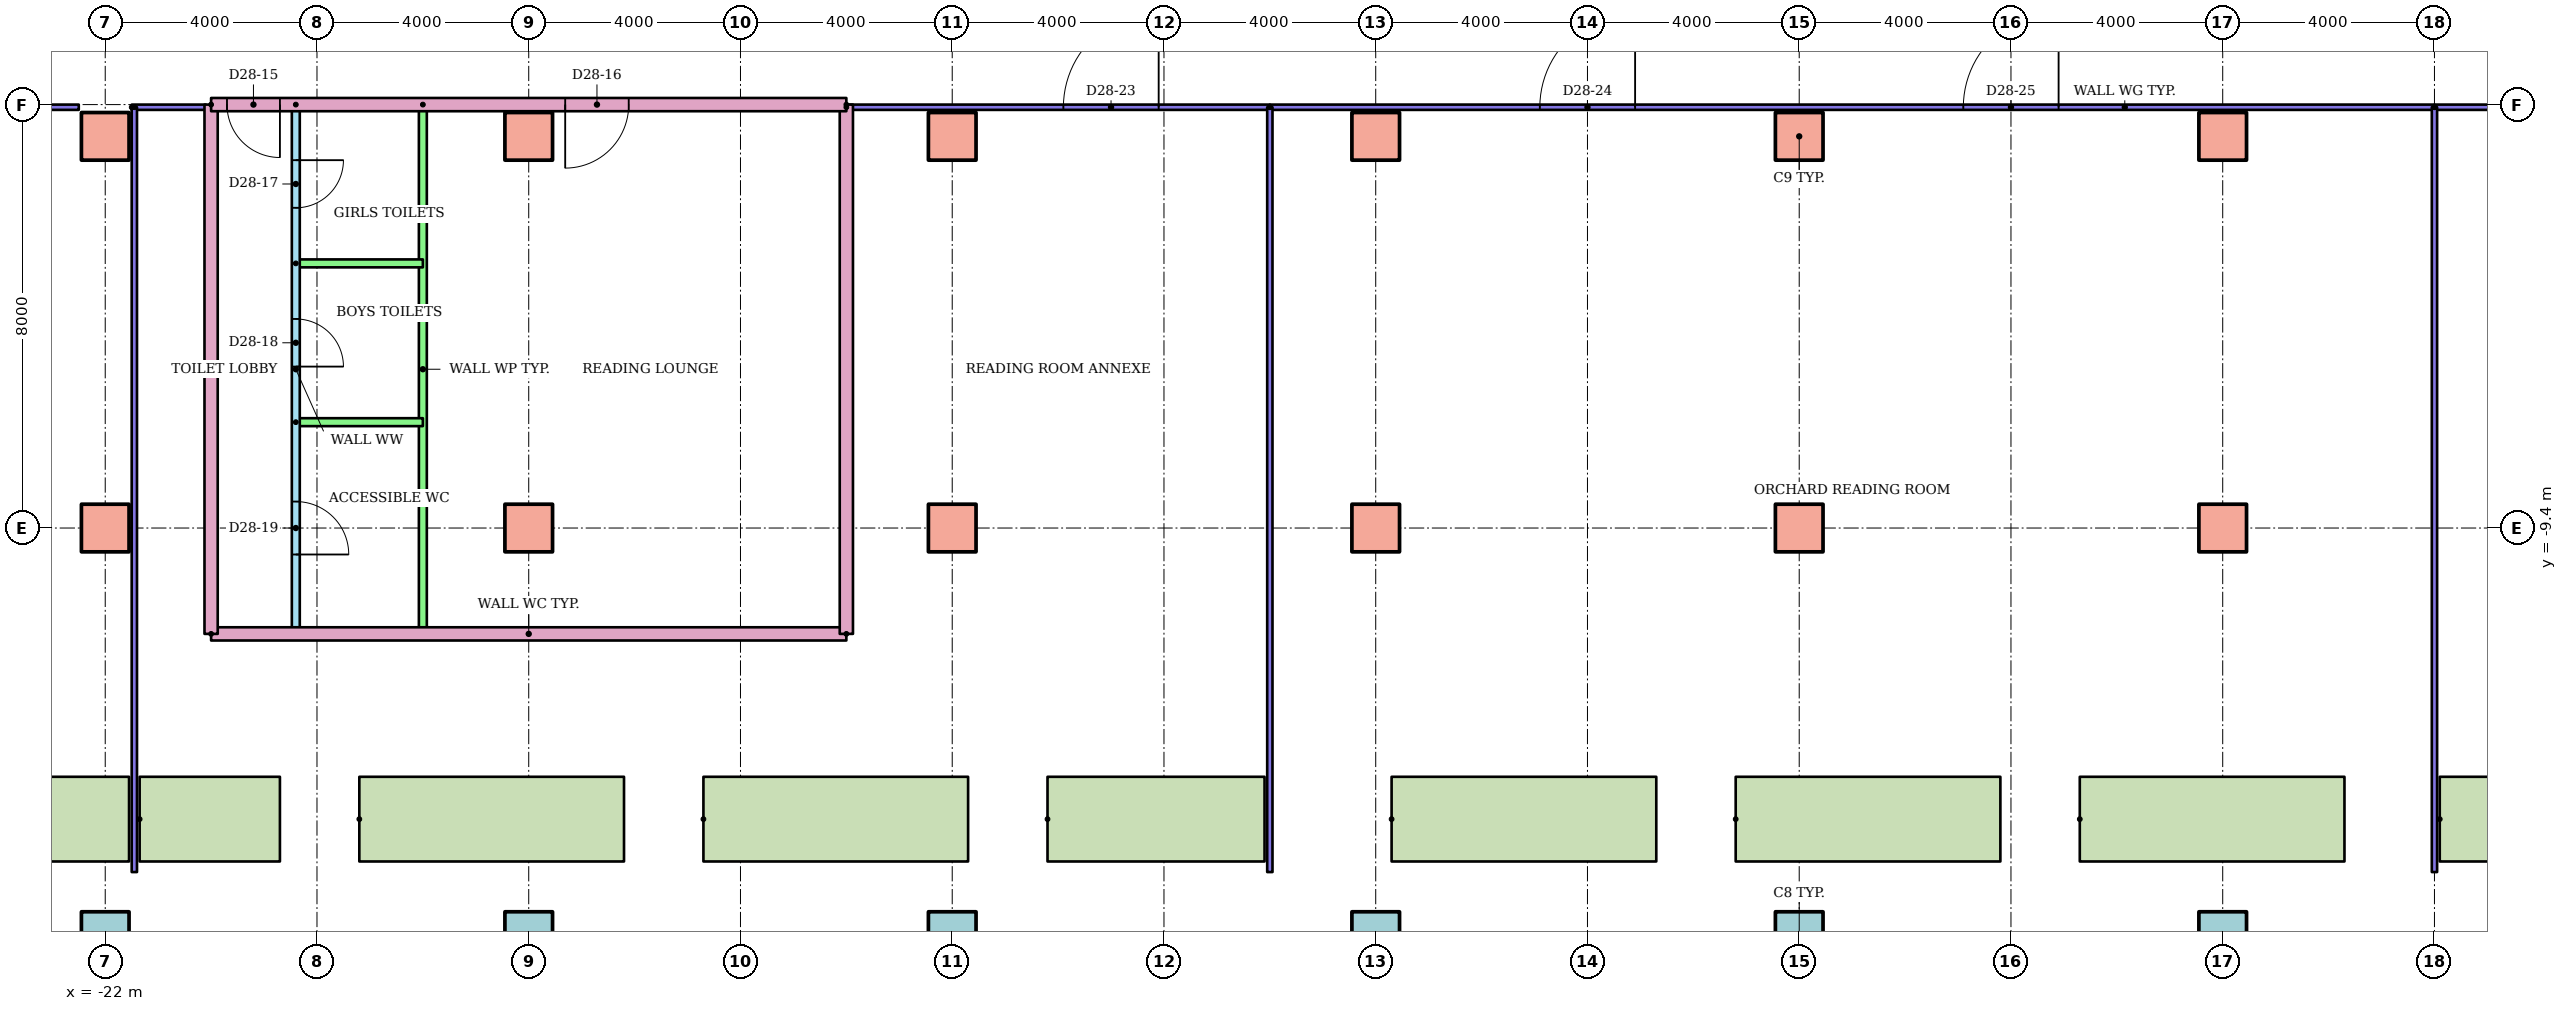
"""IFC4 building model, lengths in metres.
Left out: names, types, materials, properties, quantities, classifications, styles, units other than length and angle.
Written with IfcOpenShell. Run it as: python <this file> out.ifc"""

import sys

from ifc_helpers import new_model, si_unit, direction, frame, frame_2d, origin, origin_2d, place, context, subcontext, project, spatial, rectangle, hollow_rectangle, extrude, element, fill, save


model = new_model("IFC4")
c1 = context("Model", 3, precision=1e-05, world=origin(), true_north=direction((0.0, 1.0)))
c2 = subcontext(c1, "Body", "Model", "MODEL_VIEW")
j1 = project(units=[si_unit("LENGTHUNIT", "METRE"), si_unit("PLANEANGLEUNIT", "RADIAN")], contexts=[c1])
p1 = place(None, origin())
s1 = spatial("IfcSite", under=j1, at=p1, CompositionType="ELEMENT")
p2 = place(p1, origin())
s2 = spatial("IfcBuilding", under=s1, at=p2, CompositionType="ELEMENT")
p3 = place(p2, frame((0.0, 0.0, 106.3)))
s3 = spatial("IfcBuildingStorey", under=s2, at=p3, CompositionType="ELEMENT", Elevation=106.3)
for number, where in (
    (1, (-22.0, -17.1, 0.0)),
    (2, (-14.0, -17.1, 0.0)),
    (3, (-6.0, -17.1, 0.0)),
    (4, (2.0, -17.1, 0.0)),
    (5, (10.0, -17.1, 0.0)),
    (6, (18.0, -17.1, 0.0)),
):
    element("IfcColumn", number, at=place(p3, frame(where)), inside=s3, PredefinedType="COLUMN", context=c2, shape_type="SweptSolid", body=[
        extrude(hollow_rectangle(XDim=0.9, YDim=0.9, WallThickness=0.045, at=origin_2d()), origin(), (0.0, 0.0, 1.0), 9.6),
    ])
for number, where in (
    (7, (-22.0, -9.4, 0.0)),
    (8, (-14.0, -9.4, 0.0)),
    (9, (-6.0, -9.4, 0.0)),
    (10, (2.0, -9.4, 0.0)),
    (11, (10.0, -9.4, 0.0)),
    (12, (18.0, -9.4, 0.0)),
    (13, (-22.0, -2.0, 0.0)),
    (14, (-14.0, -2.0, 0.0)),
    (15, (-6.0, -2.0, 0.0)),
    (16, (2.0, -2.0, 0.0)),
    (17, (10.0, -2.0, 0.0)),
    (18, (18.0, -2.0, 0.0)),
):
    element("IfcColumn", number, at=place(p3, frame(where)), inside=s3, PredefinedType="COLUMN", context=c2, shape_type="SweptSolid", body=[
        extrude(rectangle(XDim=0.9, YDim=0.9, at=origin_2d()), origin(), (0.0, 0.0, 1.0), 9.6),
    ])
for number, where in (
    (19, (-17.2, -14.9, 0.0)),
    (20, (-10.7, -14.9, 0.0)),
    (21, (2.3, -14.9, 0.0)),
    (22, (8.8, -14.9, 0.0)),
    (23, (15.3, -14.9, 0.0)),
):
    element("IfcWall", number, at=place(p3, frame(where)), inside=s3, PredefinedType="STANDARD", context=c2, shape_type="SweptSolid", body=[
        extrude(rectangle(XDim=5.0, YDim=1.6, at=frame_2d((2.5, 0.0))), origin(), (0.0, 0.0, 1.0), 0.8),
    ])
p4 = place(p3, frame((-20.0, -11.4, 0.0)))
e24 = element("IfcWall", 24, at=p4, inside=s3, PredefinedType="PARTITIONING", context=c2, shape_type="SweptSolid", body=[
    extrude(rectangle(XDim=12.0, YDim=0.25, at=frame_2d((6.0, 0.0))), origin(), (0.0, 0.0, 1.0), 8.8),
])
for number, where, z_axis, x_axis in (
    (25, (-20.0, -1.4, 0.0), (0.0, 0.0, 1.0), (0.0, -1.0, 0.0)),
    (26, (-8.0, -11.4, 0.0), (0.0, 0.0, 1.0), (0.0, 1.0, 0.0)),
):
    element("IfcWall", number, at=place(p3, frame(where, z_axis=z_axis, x_axis=x_axis)), inside=s3, PredefinedType="PARTITIONING", context=c2, shape_type="SweptSolid", body=[
        extrude(rectangle(XDim=10.0, YDim=0.25, at=frame_2d((5.0, 0.0))), origin(), (0.0, 0.0, 1.0), 8.8),
    ])
p5 = place(p3, frame((-8.0, -1.4, 0.0), z_axis=(0.0, 0.0, 1.0), x_axis=(-1.0, 0.0, 0.0)))
e27 = element("IfcWall", 27, at=p5, inside=s3, PredefinedType="PARTITIONING", context=c2, shape_type="SweptSolid", body=[
    extrude(rectangle(XDim=12.0, YDim=0.25, at=frame_2d((6.0, 0.0))), origin(), (0.0, 0.0, 1.0), 8.8),
])
p6 = place(p5, frame((10.7, 0.0, 0.0)))
e28 = element("IfcOpeningElement", 28, at=p6, cuts=e27, PredefinedType="OPENING", context=c2, shape_type="SweptSolid", body=[
    extrude(rectangle(XDim=1.0, YDim=2.1, at=frame_2d((0.5, 1.05))), frame((0.0, 0.135, 0.0), z_axis=(0.0, -1.0, 0.0), x_axis=(1.0, 0.0, 0.0)), (0.0, 0.0, 1.0), 0.27),
])
p7 = place(p5, frame((4.111, 0.0, 0.0)))
e29 = element("IfcOpeningElement", 29, at=p7, cuts=e27, PredefinedType="OPENING", context=c2, shape_type="SweptSolid", body=[
    extrude(rectangle(XDim=1.2, YDim=2.1, at=frame_2d((0.6, 1.05))), frame((0.0, 0.135, 0.0), z_axis=(0.0, -1.0, 0.0), x_axis=(1.0, 0.0, 0.0)), (0.0, 0.0, 1.0), 0.27),
])
p8 = place(p3, frame((-18.4, -1.4, 0.0), z_axis=(0.0, 0.0, 1.0), x_axis=(0.0, -1.0, 0.0)))
e30 = element("IfcWall", 30, at=p8, inside=s3, PredefinedType="PARTITIONING", context=c2, shape_type="SweptSolid", body=[
    extrude(rectangle(XDim=10.0, YDim=0.15, at=frame_2d((5.0, 0.0))), origin(), (0.0, 0.0, 1.0), 8.8),
])
p9 = place(p8, frame((1.05, 0.0, 0.0)))
e31 = element("IfcOpeningElement", 31, at=p9, cuts=e30, PredefinedType="OPENING", context=c2, shape_type="SweptSolid", body=[
    extrude(rectangle(XDim=0.9, YDim=2.1, at=frame_2d((0.45, 1.05))), frame((0.0, 0.085, 0.0), z_axis=(0.0, -1.0, 0.0), x_axis=(1.0, 0.0, 0.0)), (0.0, 0.0, 1.0), 0.17),
])
p10 = place(p8, frame((4.05, 0.0, 0.0)))
e32 = element("IfcOpeningElement", 32, at=p10, cuts=e30, PredefinedType="OPENING", context=c2, shape_type="SweptSolid", body=[
    extrude(rectangle(XDim=0.9, YDim=2.1, at=frame_2d((0.45, 1.05))), frame((0.0, 0.085, 0.0), z_axis=(0.0, -1.0, 0.0), x_axis=(1.0, 0.0, 0.0)), (0.0, 0.0, 1.0), 0.17),
])
p11 = place(p8, frame((7.5, 0.0, 0.0)))
e33 = element("IfcOpeningElement", 33, at=p11, cuts=e30, PredefinedType="OPENING", context=c2, shape_type="SweptSolid", body=[
    extrude(rectangle(XDim=1.0, YDim=2.1, at=frame_2d((0.5, 1.05))), frame((0.0, 0.085, 0.0), z_axis=(0.0, -1.0, 0.0), x_axis=(1.0, 0.0, 0.0)), (0.0, 0.0, 1.0), 0.17),
])
p12 = place(p3, frame((-16.0, -1.4, 0.0), z_axis=(0.0, 0.0, 1.0), x_axis=(0.0, -1.0, 0.0)))
e34 = element("IfcWall", 34, at=p12, inside=s3, PredefinedType="PARTITIONING", context=c2, shape_type="SweptSolid", body=[
    extrude(rectangle(XDim=10.0, YDim=0.15, at=frame_2d((5.0, 0.0))), origin(), (0.0, 0.0, 1.0), 8.8),
])
for number, where in (
    (35, (-18.4, -4.4, 0.0)),
    (36, (-18.4, -7.4, 0.0)),
):
    element("IfcWall", number, at=place(p3, frame(where)), inside=s3, PredefinedType="PARTITIONING", context=c2, shape_type="SweptSolid", body=[
        extrude(rectangle(XDim=2.4, YDim=0.15, at=frame_2d((1.2, 0.0))), origin(), (0.0, 0.0, 1.0), 8.8),
    ])
p13 = place(p3, frame((-28.3, -1.45, 0.0)))
e37 = element("IfcWall", 37, at=p13, inside=s3, PredefinedType="PARTITIONING", context=c2, shape_type="SweptSolid", body=[
    extrude(rectangle(XDim=5.8, YDim=0.1, at=frame_2d((2.9, 0.0))), origin(), (0.0, 0.0, 1.0), 8.8),
])
p14 = place(p13, frame((2.2, 0.0, 0.0)))
e38 = element("IfcOpeningElement", 38, at=p14, cuts=e37, PredefinedType="OPENING", context=c2, shape_type="SweptSolid", body=[
    extrude(rectangle(XDim=1.2, YDim=2.1, at=frame_2d((0.6, 1.05))), frame((0.0, 0.06, 0.0), z_axis=(0.0, -1.0, 0.0), x_axis=(1.0, 0.0, 0.0)), (0.0, 0.0, 1.0), 0.12),
])
p15 = place(p3, frame((-21.5, -1.45, 0.0)))
e39 = element("IfcWall", 39, at=p15, inside=s3, PredefinedType="PARTITIONING", context=c2, shape_type="SweptSolid", body=[
    extrude(rectangle(XDim=1.4, YDim=0.1, at=frame_2d((0.7, 0.0))), origin(), (0.0, 0.0, 1.0), 8.8),
])
p16 = place(p3, frame((-8.0, -1.45, 0.0)))
e40 = element("IfcWall", 40, at=p16, inside=s3, PredefinedType="PARTITIONING", context=c2, shape_type="SweptSolid", body=[
    extrude(rectangle(XDim=8.0, YDim=0.1, at=frame_2d((4.0, 0.0))), origin(), (0.0, 0.0, 1.0), 8.8),
])
p17 = place(p16, frame((4.1, 0.0, 0.0)))
e41 = element("IfcOpeningElement", 41, at=p17, cuts=e40, PredefinedType="OPENING", context=c2, shape_type="SweptSolid", body=[
    extrude(rectangle(XDim=1.8, YDim=2.1, at=frame_2d((0.9, 1.05))), frame((0.0, 0.06, 0.0), z_axis=(0.0, -1.0, 0.0), x_axis=(1.0, 0.0, 0.0)), (0.0, 0.0, 1.0), 0.12),
])
p18 = place(p3, frame((0.0, -1.45, 0.0)))
e42 = element("IfcWall", 42, at=p18, inside=s3, PredefinedType="PARTITIONING", context=c2, shape_type="SweptSolid", body=[
    extrude(rectangle(XDim=22.0, YDim=0.1, at=frame_2d((11.0, 0.0))), origin(), (0.0, 0.0, 1.0), 8.8),
])
p19 = place(p18, frame((5.1, 0.0, 0.0)))
e43 = element("IfcOpeningElement", 43, at=p19, cuts=e42, PredefinedType="OPENING", context=c2, shape_type="SweptSolid", body=[
    extrude(rectangle(XDim=1.8, YDim=2.1, at=frame_2d((0.9, 1.05))), frame((0.0, 0.06, 0.0), z_axis=(0.0, -1.0, 0.0), x_axis=(1.0, 0.0, 0.0)), (0.0, 0.0, 1.0), 0.12),
])
p20 = place(p18, frame((13.1, 0.0, 0.0)))
e44 = element("IfcOpeningElement", 44, at=p20, cuts=e42, PredefinedType="OPENING", context=c2, shape_type="SweptSolid", body=[
    extrude(rectangle(XDim=1.8, YDim=2.1, at=frame_2d((0.9, 1.05))), frame((0.0, 0.06, 0.0), z_axis=(0.0, -1.0, 0.0), x_axis=(1.0, 0.0, 0.0)), (0.0, 0.0, 1.0), 0.12),
])
p21 = place(p3, frame((22.0, -1.45, 0.0)))
e45 = element("IfcWall", 45, at=p21, inside=s3, PredefinedType="PARTITIONING", context=c2, shape_type="SweptSolid", body=[
    extrude(rectangle(XDim=18.3, YDim=0.1, at=frame_2d((9.15, 0.0))), origin(), (0.0, 0.0, 1.0), 8.8),
])
p22 = place(p21, frame((7.1, 0.0, 0.0)))
e46 = element("IfcOpeningElement", 46, at=p22, cuts=e45, PredefinedType="OPENING", context=c2, shape_type="SweptSolid", body=[
    extrude(rectangle(XDim=1.8, YDim=2.1, at=frame_2d((0.9, 1.05))), frame((0.0, 0.06, 0.0), z_axis=(0.0, -1.0, 0.0), x_axis=(1.0, 0.0, 0.0)), (0.0, 0.0, 1.0), 0.12),
])
p23 = place(p21, frame((15.4, 0.0, 0.0)))
e47 = element("IfcOpeningElement", 47, at=p23, cuts=e45, PredefinedType="OPENING", context=c2, shape_type="SweptSolid", body=[
    extrude(rectangle(XDim=1.2, YDim=2.1, at=frame_2d((0.6, 1.05))), frame((0.0, 0.06, 0.0), z_axis=(0.0, -1.0, 0.0), x_axis=(1.0, 0.0, 0.0)), (0.0, 0.0, 1.0), 0.12),
])
for number, where, z_axis, x_axis in (
    (48, (22.0, -1.45, 0.0), (0.0, 0.0, 1.0), (0.0, -1.0, 0.0)),
    (49, (0.0, -1.45, 0.0), (0.0, 0.0, 1.0), (0.0, -1.0, 0.0)),
    (50, (-21.45, -1.45, 0.0), (0.0, 0.0, 1.0), (0.0, -1.0, 0.0)),
):
    element("IfcWall", number, at=place(p3, frame(where, z_axis=z_axis, x_axis=x_axis)), inside=s3, PredefinedType="PARTITIONING", context=c2, shape_type="SweptSolid", body=[
        extrude(rectangle(XDim=14.45, YDim=0.1, at=frame_2d((7.225, 0.0))), origin(), (0.0, 0.0, 1.0), 8.8),
    ])
p24 = place(p3, frame((-23.7, -14.9, 0.0)))
e51 = element("IfcWall", 51, at=p24, inside=s3, PredefinedType="STANDARD", context=c2, shape_type="SweptSolid", body=[
    extrude(rectangle(XDim=2.15, YDim=1.6, at=frame_2d((1.075, 0.0))), origin(), (0.0, 0.0, 1.0), 0.8),
])
p25 = place(p3, frame((-21.35, -14.9, 0.0)))
e52 = element("IfcWall", 52, at=p25, inside=s3, PredefinedType="STANDARD", context=c2, shape_type="SweptSolid", body=[
    extrude(rectangle(XDim=2.65, YDim=1.6, at=frame_2d((1.325, 0.0))), origin(), (0.0, 0.0, 1.0), 0.8),
])
p26 = place(p3, frame((-4.2, -14.9, 0.0)))
e53 = element("IfcWall", 53, at=p26, inside=s3, PredefinedType="STANDARD", context=c2, shape_type="SweptSolid", body=[
    extrude(rectangle(XDim=4.1, YDim=1.6, at=frame_2d((2.05, 0.0))), origin(), (0.0, 0.0, 1.0), 0.8),
])
p27 = place(p3, frame((22.1, -14.9, 0.0)))
e54 = element("IfcWall", 54, at=p27, inside=s3, PredefinedType="STANDARD", context=c2, shape_type="SweptSolid", body=[
    extrude(rectangle(XDim=4.7, YDim=1.6, at=frame_2d((2.35, 0.0))), origin(), (0.0, 0.0, 1.0), 0.8),
])
p28 = place(p6, origin())
e55 = element("IfcDoor", 55, at=p28, inside=s3, OperationType="SINGLE_SWING_LEFT", PredefinedType="DOOR", context=c2, shape_type="SweptSolid", body=[
    extrude(rectangle(XDim=1.0, YDim=2.1, at=frame_2d((0.5, 1.05))), frame((0.0, 0.025, 0.0), z_axis=(0.0, -1.0, 0.0), x_axis=(1.0, 0.0, 0.0)), (0.0, 0.0, 1.0), 0.05),
])
fill(e28, e55)
p29 = place(p7, origin())
e56 = element("IfcDoor", 56, at=p29, inside=s3, OperationType="SINGLE_SWING_RIGHT", PredefinedType="DOOR", context=c2, shape_type="SweptSolid", body=[
    extrude(rectangle(XDim=1.2, YDim=2.1, at=frame_2d((0.6, 1.05))), frame((0.0, 0.025, 0.0), z_axis=(0.0, -1.0, 0.0), x_axis=(1.0, 0.0, 0.0)), (0.0, 0.0, 1.0), 0.05),
])
fill(e29, e56)
p30 = place(p9, origin())
e57 = element("IfcDoor", 57, at=p30, inside=s3, OperationType="SINGLE_SWING_LEFT", PredefinedType="DOOR", context=c2, shape_type="SweptSolid", body=[
    extrude(rectangle(XDim=0.9, YDim=2.1, at=frame_2d((0.45, 1.05))), frame((0.0, 0.025, 0.0), z_axis=(0.0, -1.0, 0.0), x_axis=(1.0, 0.0, 0.0)), (0.0, 0.0, 1.0), 0.05),
])
fill(e31, e57)
p31 = place(p10, origin())
e58 = element("IfcDoor", 58, at=p31, inside=s3, OperationType="SINGLE_SWING_RIGHT", PredefinedType="DOOR", context=c2, shape_type="SweptSolid", body=[
    extrude(rectangle(XDim=0.9, YDim=2.1, at=frame_2d((0.45, 1.05))), frame((0.0, 0.025, 0.0), z_axis=(0.0, -1.0, 0.0), x_axis=(1.0, 0.0, 0.0)), (0.0, 0.0, 1.0), 0.05),
])
fill(e32, e58)
p32 = place(p11, origin())
e59 = element("IfcDoor", 59, at=p32, inside=s3, OperationType="SINGLE_SWING_RIGHT", PredefinedType="DOOR", context=c2, shape_type="SweptSolid", body=[
    extrude(rectangle(XDim=1.0, YDim=2.1, at=frame_2d((0.5, 1.05))), frame((0.0, 0.025, 0.0), z_axis=(0.0, -1.0, 0.0), x_axis=(1.0, 0.0, 0.0)), (0.0, 0.0, 1.0), 0.05),
])
fill(e33, e59)
p33 = place(p17, origin())
e60 = element("IfcDoor", 60, at=p33, inside=s3, OperationType="DOUBLE_DOOR_SINGLE_SWING", PredefinedType="DOOR", context=c2, shape_type="SweptSolid", body=[
    extrude(rectangle(XDim=1.8, YDim=2.1, at=frame_2d((0.9, 1.05))), frame((0.0, 0.025, 0.0), z_axis=(0.0, -1.0, 0.0), x_axis=(1.0, 0.0, 0.0)), (0.0, 0.0, 1.0), 0.05),
])
fill(e41, e60)
p34 = place(p19, origin())
e61 = element("IfcDoor", 61, at=p34, inside=s3, OperationType="DOUBLE_DOOR_SINGLE_SWING", PredefinedType="DOOR", context=c2, shape_type="SweptSolid", body=[
    extrude(rectangle(XDim=1.8, YDim=2.1, at=frame_2d((0.9, 1.05))), frame((0.0, 0.025, 0.0), z_axis=(0.0, -1.0, 0.0), x_axis=(1.0, 0.0, 0.0)), (0.0, 0.0, 1.0), 0.05),
])
fill(e43, e61)
p35 = place(p20, origin())
e62 = element("IfcDoor", 62, at=p35, inside=s3, OperationType="DOUBLE_DOOR_SINGLE_SWING", PredefinedType="DOOR", context=c2, shape_type="SweptSolid", body=[
    extrude(rectangle(XDim=1.8, YDim=2.1, at=frame_2d((0.9, 1.05))), frame((0.0, 0.025, 0.0), z_axis=(0.0, -1.0, 0.0), x_axis=(1.0, 0.0, 0.0)), (0.0, 0.0, 1.0), 0.05),
])
fill(e44, e62)
save(model, sys.argv[1])
